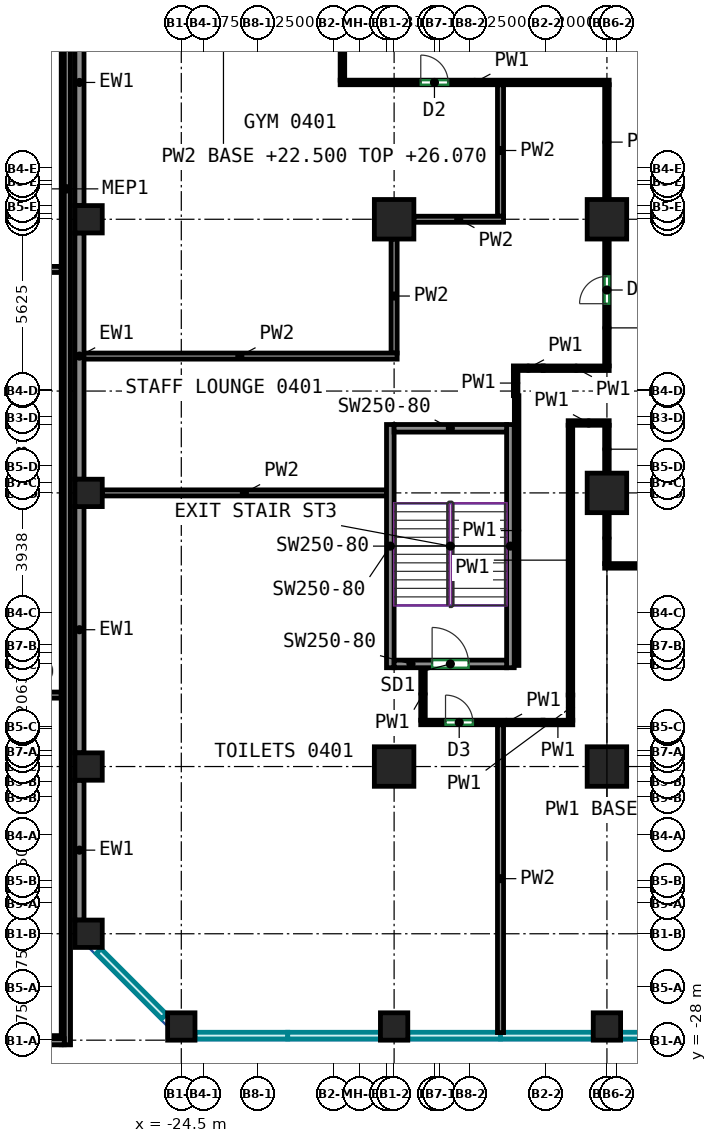
"""IFC4 building model, lengths in metres.
Left out: names, types, materials, properties, quantities, classifications, styles, units other than length and angle.
Written with IfcOpenShell. Run it as: python <this file> out.ifc"""

import sys

from ifc_helpers import new_model, si_unit, direction, frame, frame_2d, origin, origin_2d, place, context, subcontext, project, spatial, rectangle, extrude, source, transform, mapped, element, fill, save


model = new_model("IFC4")
c1 = context("Model", 3, precision=1e-05, world=origin(), true_north=direction((0.0, 1.0)))
c2 = subcontext(c1, "Body", "Model", "MODEL_VIEW")
j1 = project(units=[si_unit("LENGTHUNIT", "METRE"), si_unit("PLANEANGLEUNIT", "RADIAN")], contexts=[c1])
p1 = place(None, origin())
s1 = spatial("IfcSite", under=j1, at=p1, CompositionType="ELEMENT")
p2 = place(p1, origin())
s2 = spatial("IfcBuilding", under=s1, at=p2, CompositionType="ELEMENT")
p3 = place(p2, frame((0.0, 0.0, 22.5)))
s3 = spatial("IfcBuildingStorey", under=s2, at=p3, CompositionType="ELEMENT", Elevation=22.5)
m1 = source(origin(), c2, "Body", "SweptSolid", [
    extrude(rectangle(XDim=0.9, YDim=0.9, at=origin_2d()), origin(), (0.0, 0.0, 1.0), 4.22),
])
for number, where, z_axis, x_axis in (
    (1, (-27.55, -24.5, 0.0), (0.0, 0.0, 1.0), (1.0, 0.0, 0.0)),
    (2, (-27.55, -19.0, 0.0), (0.0, 0.0, 1.0), (1.0, 0.0, 0.0)),
    (3, (-27.55, -10.0, 0.0), (0.0, 0.0, 1.0), (1.0, 0.0, 0.0)),
    (4, (-27.55, -1.0, 0.0), (0.0, 0.0, 1.0), (1.0, 0.0, 0.0)),
    (5, (-24.5, -27.55, 0.0), (0.0, 0.0, 1.0), (1.0, 0.0, 0.0)),
    (6, (-17.5, -27.55, 0.0), (0.0, 0.0, 1.0), (1.0, 0.0, 0.0)),
):
    element("IfcColumn", number, at=place(p3, frame(where, z_axis=z_axis, x_axis=x_axis)), inside=s3, PredefinedType="COLUMN", context=c2, shape_type="MappedRepresentation", body=[
        mapped(m1, transform((0.0, 0.0, 0.0))),
    ])
m2 = source(origin(), c2, "Body", "SweptSolid", [
    extrude(rectangle(XDim=1.3, YDim=1.3, at=origin_2d()), origin(), (0.0, 0.0, 1.0), 4.22),
])
for number, where, z_axis, x_axis in (
    (7, (-17.5, -19.0, 0.0), (0.0, 0.0, 1.0), (1.0, 0.0, 0.0)),
    (8, (-17.5, -1.0, 0.0), (0.0, 0.0, 1.0), (1.0, 0.0, 0.0)),
):
    element("IfcColumn", number, at=place(p3, frame(where, z_axis=z_axis, x_axis=x_axis)), inside=s3, PredefinedType="COLUMN", context=c2, shape_type="MappedRepresentation", body=[
        mapped(m2, transform((0.0, 0.0, 0.0))),
    ])
p4 = place(p3, frame((-10.5, -27.55, 0.0), z_axis=(0.0, 0.0, 1.0), x_axis=(1.0, 0.0, 0.0)))
e9 = element("IfcColumn", 9, at=p4, inside=s3, PredefinedType="COLUMN", context=c2, shape_type="MappedRepresentation", body=[
    mapped(m1, transform((0.0, 0.0, 0.0))),
])
for number, where, z_axis, x_axis in (
    (10, (-10.5, -19.0, 0.0), (0.0, 0.0, 1.0), (1.0, 0.0, 0.0)),
    (11, (-10.5, -10.0, 0.0), (0.0, 0.0, 1.0), (1.0, 0.0, 0.0)),
    (12, (-10.5, -1.0, 0.0), (0.0, 0.0, 1.0), (1.0, 0.0, 0.0)),
):
    element("IfcColumn", number, at=place(p3, frame(where, z_axis=z_axis, x_axis=x_axis)), inside=s3, PredefinedType="COLUMN", context=c2, shape_type="MappedRepresentation", body=[
        mapped(m2, transform((0.0, 0.0, 0.0))),
    ])
m3 = source(origin(), c2, "Body", "SweptSolid", [
    extrude(rectangle(XDim=8.0, YDim=0.25, at=frame_2d((4.0, 0.0))), origin(), (0.0, 0.0, 1.0), 4.22),
])
for number, where, z_axis, x_axis in (
    (13, (-17.625, -15.75, 0.0), (0.0, 0.0, 1.0), (0.0, 1.0, 0.0)),
    (14, (-13.675, -15.75, 0.0), (0.0, 0.0, 1.0), (0.0, 1.0, 0.0)),
):
    element("IfcWall", number, at=place(p3, frame(where, z_axis=z_axis, x_axis=x_axis)), inside=s3, PredefinedType="SHEAR", context=c2, shape_type="MappedRepresentation", body=[
        mapped(m3, transform((0.0, 0.0, 0.0))),
    ])
m4 = source(origin(), c2, "Body", "SweptSolid", [
    extrude(rectangle(XDim=3.7, YDim=0.25, at=frame_2d((1.85, 0.0))), origin(), (0.0, 0.0, 1.0), 4.22),
])
p5 = place(p3, frame((-17.5, -15.625, 0.0), z_axis=(0.0, 0.0, 1.0), x_axis=(1.0, 0.0, 0.0)))
e15 = element("IfcWall", 15, at=p5, inside=s3, PredefinedType="SHEAR", context=c2, shape_type="MappedRepresentation", body=[
    mapped(m4, transform((0.0, 0.0, 0.0))),
])
p6 = place(p5, frame((1.25, 0.0, 0.0)))
e16 = element("IfcOpeningElement", 16, at=p6, cuts=e15, PredefinedType="OPENING", context=c2, shape_type="SweptSolid", body=[
    extrude(rectangle(XDim=1.2, YDim=2.1, at=frame_2d((0.6, 1.05))), frame((0.0, 0.135, 0.0), z_axis=(0.0, -1.0, 0.0), x_axis=(1.0, 0.0, 0.0)), (0.0, 0.0, 1.0), 0.27),
])
p7 = place(p3, frame((-17.5, -7.875, 0.0), z_axis=(0.0, 0.0, 1.0), x_axis=(1.0, 0.0, 0.0)))
e17 = element("IfcWall", 17, at=p7, inside=s3, PredefinedType="SHEAR", context=c2, shape_type="MappedRepresentation", body=[
    mapped(m4, transform((0.0, 0.0, 0.0))),
])
m5 = source(origin(), c2, "Body", "SweptSolid", [
    extrude(rectangle(XDim=8.1, YDim=0.3, at=frame_2d((4.05, 0.0))), origin(), (0.0, 0.0, 1.0), 4.22),
])
for number, where, z_axis, x_axis in (
    (18, (-27.85, 7.55, 0.0), (0.0, 0.0, 1.0), (0.0, -1.0, 0.0)),
    (19, (-27.85, -1.45, 0.0), (0.0, 0.0, 1.0), (0.0, -1.0, 0.0)),
    (20, (-27.85, -10.45, 0.0), (0.0, 0.0, 1.0), (0.0, -1.0, 0.0)),
):
    element("IfcWall", number, at=place(p3, frame(where, z_axis=z_axis, x_axis=x_axis)), inside=s3, PredefinedType="SOLIDWALL", context=c2, shape_type="MappedRepresentation", body=[
        mapped(m5, transform((0.0, 0.0, 0.0))),
    ])
m6 = source(origin(), c2, "Body", "SweptSolid", [
    extrude(rectangle(XDim=4.6, YDim=0.3, at=frame_2d((2.3, 0.0))), origin(), (0.0, 0.0, 1.0), 4.22),
])
p8 = place(p3, frame((-27.85, -19.45, 0.0), z_axis=(0.0, 0.0, 1.0), x_axis=(0.0, -1.0, 0.0)))
e21 = element("IfcWall", 21, at=p8, inside=s3, PredefinedType="SOLIDWALL", context=c2, shape_type="MappedRepresentation", body=[
    mapped(m6, transform((0.0, 0.0, 0.0))),
])
m7 = source(origin(), c2, "Body", "SweptSolid", [
    extrude(rectangle(XDim=56.3, YDim=0.3, at=frame_2d((28.15, 0.0))), origin(), (0.0, 0.0, 1.0), 4.22),
])
p9 = place(p3, frame((-28.3, 28.15, 0.0), z_axis=(0.0, 0.0, 1.0), x_axis=(0.0, -1.0, 0.0)))
e22 = element("IfcWall", 22, at=p9, inside=s3, PredefinedType="SOLIDWALL", context=c2, shape_type="MappedRepresentation", body=[
    mapped(m7, transform((0.0, 0.0, 0.0))),
])
m8 = source(origin(), c2, "Body", "SweptSolid", [
    extrude(rectangle(XDim=12.0, YDim=0.3, at=frame_2d((6.0, 0.0))), origin(), (0.0, 0.0, 1.0), 4.22),
])
p10 = place(p3, frame((-28.45, -28.0, 0.0), z_axis=(0.0, 0.0, 1.0), x_axis=(-1.0, 0.0, 0.0)))
e23 = element("IfcWall", 23, at=p10, inside=s3, PredefinedType="SOLIDWALL", context=c2, shape_type="MappedRepresentation", body=[
    mapped(m8, transform((0.0, 0.0, 0.0))),
])
p11 = place(p10, frame((2.8, 0.0, 0.9)))
e24 = element("IfcOpeningElement", 24, at=p11, cuts=e23, PredefinedType="OPENING", context=c2, shape_type="SweptSolid", body=[
    extrude(rectangle(XDim=2.4, YDim=1.8, at=frame_2d((1.2, 0.9))), frame((0.0, 0.16, 0.0), z_axis=(0.0, -1.0, 0.0), x_axis=(1.0, 0.0, 0.0)), (0.0, 0.0, 1.0), 0.32),
])
p12 = place(p10, frame((6.8, 0.0, 0.9)))
e25 = element("IfcOpeningElement", 25, at=p12, cuts=e23, PredefinedType="OPENING", context=c2, shape_type="SweptSolid", body=[
    extrude(rectangle(XDim=2.4, YDim=1.8, at=frame_2d((1.2, 0.9))), frame((0.0, 0.16, 0.0), z_axis=(0.0, -1.0, 0.0), x_axis=(1.0, 0.0, 0.0)), (0.0, 0.0, 1.0), 0.32),
])
m9 = source(origin(), c2, "Body", "SweptSolid", [
    extrude(rectangle(XDim=56.3, YDim=0.2, at=frame_2d((28.15, 0.0))), origin(), (0.0, 0.0, 1.0), 1.1),
])
p13 = place(p3, frame((-28.25, 28.15, 4.5), z_axis=(0.0, 0.0, 1.0), x_axis=(0.0, -1.0, 0.0)))
e26 = element("IfcWall", 26, at=p13, inside=s3, PredefinedType="PARAPET", context=c2, shape_type="MappedRepresentation", body=[
    mapped(m9, transform((0.0, 0.0, 0.0))),
])
m10 = source(origin(), c2, "Body", "SweptSolid", [
    extrude(rectangle(XDim=12.0, YDim=0.2, at=frame_2d((6.0, 0.0))), origin(), (0.0, 0.0, 1.0), 1.1),
])
p14 = place(p3, frame((-28.35, -28.05, 4.5), z_axis=(0.0, 0.0, 1.0), x_axis=(-1.0, 0.0, 0.0)))
e27 = element("IfcWall", 27, at=p14, inside=s3, PredefinedType="PARAPET", context=c2, shape_type="MappedRepresentation", body=[
    mapped(m10, transform((0.0, 0.0, 0.0))),
])
p15 = place(p3, frame((-19.275, 3.5, 0.0), z_axis=(0.0, 0.0, 1.0), x_axis=(1.0, 0.0, 0.0)))
e28 = element("IfcWall", 28, at=p15, inside=s3, PredefinedType="PARTITIONING", context=c2, shape_type="SweptSolid", body=[
    extrude(rectangle(XDim=8.85, YDim=0.15, at=frame_2d((4.425, 0.0))), origin(), (0.0, 0.0, 1.0), 4.22),
])
p16 = place(p15, frame((2.652, 0.0, 0.0)))
e29 = element("IfcOpeningElement", 29, at=p16, cuts=e28, PredefinedType="OPENING", context=c2, shape_type="SweptSolid", body=[
    extrude(rectangle(XDim=0.9, YDim=2.1, at=frame_2d((0.45, 1.05))), frame((0.0, 0.085, 0.0), z_axis=(0.0, -1.0, 0.0), x_axis=(1.0, 0.0, 0.0)), (0.0, 0.0, 1.0), 0.17),
])
p17 = place(p3, frame((-19.2, 3.575, 0.0), z_axis=(0.0, 0.0, 1.0), x_axis=(0.0, 1.0, 0.0)))
e30 = element("IfcWall", 30, at=p17, inside=s3, PredefinedType="PARTITIONING", context=c2, shape_type="SweptSolid", body=[
    extrude(rectangle(XDim=4.335, YDim=0.15, at=frame_2d((2.167, 0.0))), origin(), (0.0, 0.0, 1.0), 4.22),
])
p18 = place(p3, frame((-12.598, -5.898, 0.0), z_axis=(0.0, 0.0, 1.0), x_axis=(-1.0, 0.0, 0.0)))
e31 = element("IfcWall", 31, at=p18, inside=s3, PredefinedType="PARTITIONING", context=c2, shape_type="SweptSolid", body=[
    extrude(rectangle(XDim=0.979, YDim=0.15, at=frame_2d((0.49, 0.0))), origin(), (0.0, 0.0, 1.0), 4.22),
])
p19 = place(p3, frame((-10.425, -5.9, 0.0), z_axis=(0.0, 0.0, 1.0), x_axis=(-1.0, 0.0, 0.0)))
e32 = element("IfcWall", 32, at=p19, inside=s3, PredefinedType="PARTITIONING", context=c2, shape_type="SweptSolid", body=[
    extrude(rectangle(XDim=2.173, YDim=0.15, at=frame_2d((1.086, 0.0))), origin(), (0.0, 0.0, 1.0), 4.22),
])
p20 = place(p3, frame((-10.5, -5.825, 0.0), z_axis=(0.0, 0.0, 1.0), x_axis=(0.0, 1.0, 0.0)))
e33 = element("IfcWall", 33, at=p20, inside=s3, PredefinedType="PARTITIONING", context=c2, shape_type="SweptSolid", body=[
    extrude(rectangle(XDim=4.175, YDim=0.15, at=frame_2d((2.087, 0.0))), origin(), (0.0, 0.0, 1.0), 3.57),
])
p21 = place(p20, frame((2.048, 0.0, 0.0)))
e34 = element("IfcOpeningElement", 34, at=p21, cuts=e33, PredefinedType="OPENING", context=c2, shape_type="SweptSolid", body=[
    extrude(rectangle(XDim=0.9, YDim=2.1, at=frame_2d((0.45, 1.05))), frame((0.0, 0.085, 0.0), z_axis=(0.0, -1.0, 0.0), x_axis=(1.0, 0.0, 0.0)), (0.0, 0.0, 1.0), 0.17),
])
p22 = place(p3, frame((-10.5, -0.35, 0.0), z_axis=(0.0, 0.0, 1.0), x_axis=(0.0, 1.0, 0.0)))
e35 = element("IfcWall", 35, at=p22, inside=s3, PredefinedType="PARTITIONING", context=c2, shape_type="SweptSolid", body=[
    extrude(rectangle(XDim=3.775, YDim=0.15, at=frame_2d((1.888, 0.0))), origin(), (0.0, 0.0, 1.0), 4.22),
])
p23 = place(p3, frame((-13.47, -6.802, 0.0), z_axis=(0.0, 0.0, 1.0), x_axis=(0.0, -1.0, 0.0)))
e36 = element("IfcWall", 36, at=p23, inside=s3, PredefinedType="PARTITIONING", context=c2, shape_type="SweptSolid", body=[
    extrude(rectangle(XDim=8.873, YDim=0.15, at=frame_2d((4.437, 0.0))), origin(), (0.0, 0.0, 1.0), 4.22),
])
p24 = place(p3, frame((-13.502, -5.973, 0.0), z_axis=(0.0, 0.0, 1.0), x_axis=(0.0, -1.0, 0.0)))
e37 = element("IfcWall", 37, at=p24, inside=s3, PredefinedType="PARTITIONING", context=c2, shape_type="SweptSolid", body=[
    extrude(rectangle(XDim=0.829, YDim=0.15, at=frame_2d((0.415, 0.0))), origin(), (0.0, 0.0, 1.0), 4.22),
])
p25 = place(p3, frame((-10.575, -12.4, 0.0), z_axis=(0.0, 0.0, 1.0), x_axis=(1.0, 0.0, 0.0)))
e38 = element("IfcWall", 38, at=p25, inside=s3, PredefinedType="PARTITIONING", context=c2, shape_type="SweptSolid", body=[
    extrude(rectangle(XDim=21.175, YDim=0.15, at=frame_2d((10.587, 0.0))), origin(), (0.0, 0.0, 1.0), 4.22),
])
p26 = place(p25, frame((7.777, 0.0, 0.0)))
e39 = element("IfcOpeningElement", 39, at=p26, cuts=e38, PredefinedType="OPENING", context=c2, shape_type="SweptSolid", body=[
    extrude(rectangle(XDim=1.8, YDim=2.1, at=frame_2d((0.9, 1.05))), frame((0.0, 0.085, 0.0), z_axis=(0.0, -1.0, 0.0), x_axis=(1.0, 0.0, 0.0)), (0.0, 0.0, 1.0), 0.17),
])
p27 = place(p25, frame((12.772, 0.0, 0.0)))
e40 = element("IfcOpeningElement", 40, at=p27, cuts=e38, PredefinedType="OPENING", context=c2, shape_type="SweptSolid", body=[
    extrude(rectangle(XDim=0.9, YDim=2.1, at=frame_2d((0.45, 1.05))), frame((0.0, 0.085, 0.0), z_axis=(0.0, -1.0, 0.0), x_axis=(1.0, 0.0, 0.0)), (0.0, 0.0, 1.0), 0.17),
])
p28 = place(p25, frame((18.066, 0.0, 0.0)))
e41 = element("IfcOpeningElement", 41, at=p28, cuts=e38, PredefinedType="OPENING", context=c2, shape_type="SweptSolid", body=[
    extrude(rectangle(XDim=0.9, YDim=2.1, at=frame_2d((0.45, 1.05))), frame((0.0, 0.085, 0.0), z_axis=(0.0, -1.0, 0.0), x_axis=(1.0, 0.0, 0.0)), (0.0, 0.0, 1.0), 0.17),
])
p29 = place(p3, frame((-10.5, -12.325, 0.0), z_axis=(0.0, 0.0, 1.0), x_axis=(0.0, 1.0, 0.0)))
e42 = element("IfcWall", 42, at=p29, inside=s3, PredefinedType="PARTITIONING", context=c2, shape_type="SweptSolid", body=[
    extrude(rectangle(XDim=1.675, YDim=0.15, at=frame_2d((0.837, 0.0))), origin(), (0.0, 0.0, 1.0), 3.57),
])
p30 = place(p3, frame((-10.5, -9.35, 0.0), z_axis=(0.0, 0.0, 1.0), x_axis=(0.0, 1.0, 0.0)))
e43 = element("IfcWall", 43, at=p30, inside=s3, PredefinedType="PARTITIONING", context=c2, shape_type="SweptSolid", body=[
    extrude(rectangle(XDim=1.575, YDim=0.15, at=frame_2d((0.788, 0.0))), origin(), (0.0, 0.0, 1.0), 3.57),
])
p31 = place(p3, frame((-11.775, -7.7, 0.0), z_axis=(0.0, 0.0, 1.0), x_axis=(1.0, 0.0, 0.0)))
e44 = element("IfcWall", 44, at=p31, inside=s3, PredefinedType="PARTITIONING", context=c2, shape_type="SweptSolid", body=[
    extrude(rectangle(XDim=1.35, YDim=0.15, at=frame_2d((0.675, 0.0))), origin(), (0.0, 0.0, 1.0), 4.22),
])
p32 = place(p3, frame((-11.7, -16.648, 0.0), z_axis=(0.0, 0.0, 1.0), x_axis=(0.0, 1.0, 0.0)))
e45 = element("IfcWall", 45, at=p32, inside=s3, PredefinedType="PARTITIONING", context=c2, shape_type="SweptSolid", body=[
    extrude(rectangle(XDim=8.873, YDim=0.15, at=frame_2d((4.437, 0.0))), origin(), (0.0, 0.0, 1.0), 4.22),
])
p33 = place(p3, frame((-11.698, -17.477, 0.0), z_axis=(0.0, 0.0, 1.0), x_axis=(0.0, 1.0, 0.0)))
e46 = element("IfcWall", 46, at=p33, inside=s3, PredefinedType="PARTITIONING", context=c2, shape_type="SweptSolid", body=[
    extrude(rectangle(XDim=0.829, YDim=0.15, at=frame_2d((0.415, 0.0))), origin(), (0.0, 0.0, 1.0), 4.22),
])
p34 = place(p3, frame((-12.602, -17.552, 0.0), z_axis=(0.0, 0.0, 1.0), x_axis=(1.0, 0.0, 0.0)))
e47 = element("IfcWall", 47, at=p34, inside=s3, PredefinedType="PARTITIONING", context=c2, shape_type="SweptSolid", body=[
    extrude(rectangle(XDim=0.979, YDim=0.15, at=frame_2d((0.49, 0.0))), origin(), (0.0, 0.0, 1.0), 4.22),
])
p35 = place(p3, frame((-16.625, -17.55, 0.0), z_axis=(0.0, 0.0, 1.0), x_axis=(1.0, 0.0, 0.0)))
e48 = element("IfcWall", 48, at=p35, inside=s3, PredefinedType="PARTITIONING", context=c2, shape_type="SweptSolid", body=[
    extrude(rectangle(XDim=4.023, YDim=0.15, at=frame_2d((2.011, 0.0))), origin(), (0.0, 0.0, 1.0), 4.22),
])
p36 = place(p35, frame((0.816, 0.0, 0.0)))
e49 = element("IfcOpeningElement", 49, at=p36, cuts=e48, PredefinedType="OPENING", context=c2, shape_type="SweptSolid", body=[
    extrude(rectangle(XDim=0.9, YDim=2.1, at=frame_2d((0.45, 1.05))), frame((0.0, 0.085, 0.0), z_axis=(0.0, -1.0, 0.0), x_axis=(1.0, 0.0, 0.0)), (0.0, 0.0, 1.0), 0.17),
])
p37 = place(p3, frame((-16.55, -15.75, 0.0), z_axis=(0.0, 0.0, 1.0), x_axis=(0.0, -1.0, 0.0)))
e50 = element("IfcWall", 50, at=p37, inside=s3, PredefinedType="PARTITIONING", context=c2, shape_type="SweptSolid", body=[
    extrude(rectangle(XDim=1.725, YDim=0.15, at=frame_2d((0.863, 0.0))), origin(), (0.0, 0.0, 1.0), 4.22),
])
p38 = place(p3, frame((-14.0, -0.9, 0.0), z_axis=(0.0, 0.0, 1.0), x_axis=(0.0, 1.0, 0.0)))
e51 = element("IfcWall", 51, at=p38, inside=s3, PredefinedType="PARTITIONING", context=c2, shape_type="SweptSolid", body=[
    extrude(rectangle(XDim=4.324, YDim=0.2, at=frame_2d((2.162, 0.0))), origin(), (0.0, 0.0, 1.0), 4.22),
])
p39 = place(p3, frame((-16.85, -1.0, 0.0), z_axis=(0.0, 0.0, 1.0), x_axis=(1.0, 0.0, 0.0)))
e52 = element("IfcWall", 52, at=p39, inside=s3, PredefinedType="PARTITIONING", context=c2, shape_type="SweptSolid", body=[
    extrude(rectangle(XDim=2.95, YDim=0.2, at=frame_2d((1.475, 0.0))), origin(), (0.0, 0.0, 1.0), 4.22),
])
p40 = place(p3, frame((-17.5, -5.4, 0.0), z_axis=(0.0, 0.0, 1.0), x_axis=(0.0, 1.0, 0.0)))
e53 = element("IfcWall", 53, at=p40, inside=s3, PredefinedType="PARTITIONING", context=c2, shape_type="SweptSolid", body=[
    extrude(rectangle(XDim=3.75, YDim=0.2, at=frame_2d((1.875, 0.0))), origin(), (0.0, 0.0, 1.0), 4.22),
])
p41 = place(p3, frame((-27.75, -5.5, 0.0), z_axis=(0.0, 0.0, 1.0), x_axis=(1.0, 0.0, 0.0)))
e54 = element("IfcWall", 54, at=p41, inside=s3, PredefinedType="PARTITIONING", context=c2, shape_type="SweptSolid", body=[
    extrude(rectangle(XDim=10.35, YDim=0.2, at=frame_2d((5.175, 0.0))), origin(), (0.0, 0.0, 1.0), 4.22),
])
p42 = place(p3, frame((-27.1, -10.0, 0.0), z_axis=(0.0, 0.0, 1.0), x_axis=(1.0, 0.0, 0.0)))
e55 = element("IfcWall", 55, at=p42, inside=s3, PredefinedType="PARTITIONING", context=c2, shape_type="SweptSolid", body=[
    extrude(rectangle(XDim=9.35, YDim=0.2, at=frame_2d((4.675, 0.0))), origin(), (0.0, 0.0, 1.0), 4.22),
])
p43 = place(p3, frame((-14.0, -27.75, 0.0), z_axis=(0.0, 0.0, 1.0), x_axis=(0.0, 1.0, 0.0)))
e56 = element("IfcWall", 56, at=p43, inside=s3, PredefinedType="PARTITIONING", context=c2, shape_type="SweptSolid", body=[
    extrude(rectangle(XDim=10.124, YDim=0.2, at=frame_2d((5.062, 0.0))), origin(), (0.0, 0.0, 1.0), 4.22),
])
m11 = source(origin(), c2, "Body", "SweptSolid", [
    extrude(rectangle(XDim=10.1, YDim=0.2, at=frame_2d((5.05, 0.0))), origin(), (0.0, 0.0, 1.0), 3.42),
])
p44 = place(p3, frame((-38.55, -2.65, 0.0), z_axis=(0.0, 0.0, 1.0), x_axis=(1.0, 0.0, 0.0)))
e57 = element("IfcWall", 57, at=p44, inside=s3, PredefinedType="PARTITIONING", context=c2, shape_type="MappedRepresentation", body=[
    mapped(m11, transform((0.0, 0.0, 0.0))),
])
m12 = source(origin(), c2, "Body", "SweptSolid", [
    extrude(rectangle(XDim=4.85, YDim=0.2, at=frame_2d((2.425, 0.0))), origin(), (0.0, 0.0, 1.0), 3.42),
])
p45 = place(p3, frame((-33.3, -16.65, 0.0), z_axis=(0.0, 0.0, 1.0), x_axis=(1.0, 0.0, 0.0)))
e58 = element("IfcWall", 58, at=p45, inside=s3, PredefinedType="PARTITIONING", context=c2, shape_type="MappedRepresentation", body=[
    mapped(m12, transform((0.0, 0.0, 0.0))),
])
p46 = place(p6, origin())
e59 = element("IfcDoor", 59, at=p46, inside=s3, OperationType="DOUBLE_DOOR_SINGLE_SWING", PredefinedType="DOOR", context=c2, shape_type="SweptSolid", body=[
    extrude(rectangle(XDim=1.2, YDim=2.1, at=frame_2d((0.6, 1.05))), frame((0.0, 0.025, 0.0), z_axis=(0.0, -1.0, 0.0), x_axis=(1.0, 0.0, 0.0)), (0.0, 0.0, 1.0), 0.05),
])
fill(e16, e59)
p47 = place(p36, origin())
e60 = element("IfcDoor", 60, at=p47, inside=s3, OperationType="SINGLE_SWING_LEFT", PredefinedType="DOOR", context=c2, shape_type="SweptSolid", body=[
    extrude(rectangle(XDim=0.9, YDim=2.1, at=frame_2d((0.45, 1.05))), frame((0.0, 0.025, 0.0), z_axis=(0.0, -1.0, 0.0), x_axis=(1.0, 0.0, 0.0)), (0.0, 0.0, 1.0), 0.05),
])
fill(e49, e60)
p48 = place(p21, origin())
e61 = element("IfcDoor", 61, at=p48, inside=s3, OperationType="SINGLE_SWING_LEFT", PredefinedType="DOOR", context=c2, shape_type="SweptSolid", body=[
    extrude(rectangle(XDim=0.9, YDim=2.1, at=frame_2d((0.45, 1.05))), frame((0.0, 0.025, 0.0), z_axis=(0.0, -1.0, 0.0), x_axis=(1.0, 0.0, 0.0)), (0.0, 0.0, 1.0), 0.05),
])
fill(e34, e61)
p49 = place(p16, origin())
e62 = element("IfcDoor", 62, at=p49, inside=s3, OperationType="SINGLE_SWING_LEFT", PredefinedType="DOOR", context=c2, shape_type="SweptSolid", body=[
    extrude(rectangle(XDim=0.9, YDim=2.1, at=frame_2d((0.45, 1.05))), frame((0.0, 0.025, 0.0), z_axis=(0.0, -1.0, 0.0), x_axis=(1.0, 0.0, 0.0)), (0.0, 0.0, 1.0), 0.05),
])
fill(e29, e62)
save(model, sys.argv[1])
